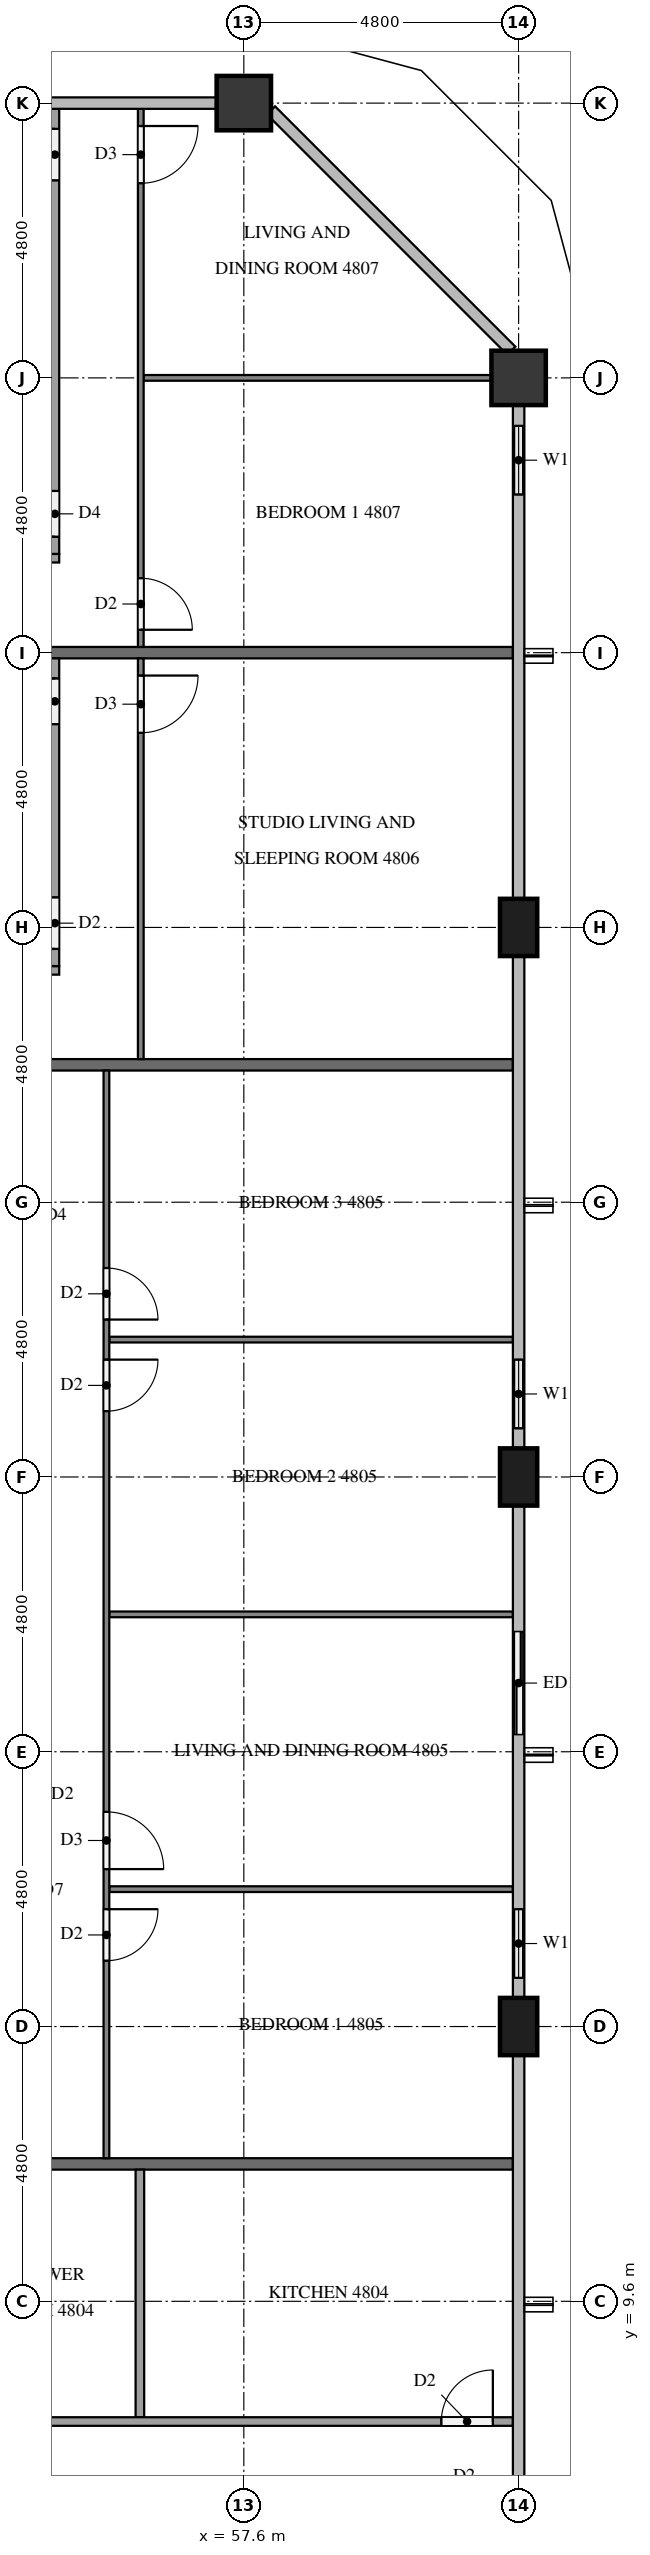
"""IFC4 building model, lengths in metres.
Left out: names, types, materials, properties, quantities, classifications, styles, units other than length and angle.
Written with IfcOpenShell. Run it as: python <this file> out.ifc"""

import sys

from ifc_helpers import new_model, si_unit, direction, frame, frame_2d, origin, origin_2d, place, context, subcontext, project, spatial, rectangle, extrude, element, fill, save


model = new_model("IFC4")
c1 = context("Model", 3, precision=1e-05, world=origin(), true_north=direction((0.0, 1.0)))
c2 = subcontext(c1, "Body", "Model", "MODEL_VIEW")
j1 = project(units=[si_unit("LENGTHUNIT", "METRE"), si_unit("PLANEANGLEUNIT", "RADIAN")], contexts=[c1])
p1 = place(None, origin())
s1 = spatial("IfcSite", under=j1, at=p1, CompositionType="ELEMENT")
p2 = place(p1, origin())
s2 = spatial("IfcBuilding", under=s1, at=p2, CompositionType="ELEMENT")
p3 = place(p2, frame((0.0, 0.0, 185.9)))
s3 = spatial("IfcBuildingStorey", under=s2, at=p3, CompositionType="ELEMENT", Elevation=185.9)
for number, where, z_axis, x_axis in (
    (1, (62.4, 14.4, 0.0), (0.0, 0.0, 1.0), (0.0, 1.0, 0.0)),
    (2, (62.4, 24.0, 0.0), (0.0, 0.0, 1.0), (0.0, 1.0, 0.0)),
    (3, (62.4, 33.6, 0.0), (0.0, 0.0, 1.0), (0.0, 1.0, 0.0)),
):
    element("IfcColumn", number, at=place(p3, frame(where, z_axis=z_axis, x_axis=x_axis)), inside=s3, PredefinedType="COLUMN", context=c2, shape_type="SweptSolid", body=[
        extrude(rectangle(XDim=1.0, YDim=0.65, at=origin_2d()), origin(), (0.0, 0.0, 1.0), 3.2),
    ])
for number, where, z_axis, x_axis in (
    (4, (62.4, 43.2, 0.0), (0.0, 0.0, 1.0), (1.0, 0.0, 0.0)),
    (5, (57.6, 48.0, 0.0), (0.0, 0.0, 1.0), (1.0, 0.0, 0.0)),
):
    element("IfcColumn", number, at=place(p3, frame(where, z_axis=z_axis, x_axis=x_axis)), inside=s3, PredefinedType="COLUMN", context=c2, shape_type="SweptSolid", body=[
        extrude(rectangle(XDim=0.95, YDim=0.95, at=origin_2d()), origin(), (0.0, 0.0, 1.0), 3.2),
    ])
p4 = place(p3, frame((62.4, 14.9, 0.0), z_axis=(0.0, 0.0, 1.0), x_axis=(0.0, 1.0, 0.0)))
e6 = element("IfcWall", 6, at=p4, inside=s3, PredefinedType="SOLIDWALL", context=c2, shape_type="SweptSolid", body=[
    extrude(rectangle(XDim=1.9, YDim=0.15, at=frame_2d((0.95, 0.0))), origin(), (0.0, 0.0, 1.0), 3.2),
])
p5 = place(p4, frame((0.35, 0.0, 0.9)))
e7 = element("IfcOpeningElement", 7, at=p5, cuts=e6, PredefinedType="OPENING", context=c2, shape_type="SweptSolid", body=[
    extrude(rectangle(XDim=1.2, YDim=1.4, at=frame_2d((0.6, 0.7))), frame((0.0, 0.085, 0.0), z_axis=(0.0, -1.0, 0.0), x_axis=(1.0, 0.0, 0.0)), (0.0, 0.0, 1.0), 0.17),
])
p6 = place(p3, frame((62.4, 19.2, 0.0), z_axis=(0.0, 0.0, 1.0), x_axis=(0.0, 1.0, 0.0)))
e8 = element("IfcWall", 8, at=p6, inside=s3, PredefinedType="SOLIDWALL", context=c2, shape_type="SweptSolid", body=[
    extrude(rectangle(XDim=2.4, YDim=0.15, at=frame_2d((1.2, 0.0))), origin(), (0.0, 0.0, 1.0), 3.2),
])
p7 = place(p6, frame((0.3, 0.0, 0.0)))
e9 = element("IfcOpeningElement", 9, at=p7, cuts=e8, PredefinedType="OPENING", context=c2, shape_type="SweptSolid", body=[
    extrude(rectangle(XDim=1.8, YDim=2.4, at=frame_2d((0.9, 1.2))), frame((0.0, 0.085, 0.0), z_axis=(0.0, -1.0, 0.0), x_axis=(1.0, 0.0, 0.0)), (0.0, 0.0, 1.0), 0.17),
])
p8 = place(p3, frame((62.4, 24.5, 0.0), z_axis=(0.0, 0.0, 1.0), x_axis=(0.0, 1.0, 0.0)))
e10 = element("IfcWall", 10, at=p8, inside=s3, PredefinedType="SOLIDWALL", context=c2, shape_type="SweptSolid", body=[
    extrude(rectangle(XDim=1.9, YDim=0.15, at=frame_2d((0.95, 0.0))), origin(), (0.0, 0.0, 1.0), 3.2),
])
p9 = place(p8, frame((0.35, 0.0, 0.9)))
e11 = element("IfcOpeningElement", 11, at=p9, cuts=e10, PredefinedType="OPENING", context=c2, shape_type="SweptSolid", body=[
    extrude(rectangle(XDim=1.2, YDim=1.4, at=frame_2d((0.6, 0.7))), frame((0.0, 0.085, 0.0), z_axis=(0.0, -1.0, 0.0), x_axis=(1.0, 0.0, 0.0)), (0.0, 0.0, 1.0), 0.17),
])
p10 = place(p3, frame((62.4, 40.8, 0.0), z_axis=(0.0, 0.0, 1.0), x_axis=(0.0, 1.0, 0.0)))
e12 = element("IfcWall", 12, at=p10, inside=s3, PredefinedType="SOLIDWALL", context=c2, shape_type="SweptSolid", body=[
    extrude(rectangle(XDim=1.925, YDim=0.15, at=frame_2d((0.962, 0.0))), origin(), (0.0, 0.0, 1.0), 3.2),
])
p11 = place(p10, frame((0.363, 0.0, 0.9)))
e13 = element("IfcOpeningElement", 13, at=p11, cuts=e12, PredefinedType="OPENING", context=c2, shape_type="SweptSolid", body=[
    extrude(rectangle(XDim=1.2, YDim=1.4, at=frame_2d((0.6, 0.7))), frame((0.0, 0.085, 0.0), z_axis=(0.0, -1.0, 0.0), x_axis=(1.0, 0.0, 0.0)), (0.0, 0.0, 1.0), 0.17),
])
for number, where, z_axis, x_axis in (
    (14, (50.5, 12.0, 0.0), (0.0, 0.0, 1.0), (1.0, 0.0, 0.0)),
    (15, (50.5, 31.2, 0.0), (0.0, 0.0, 1.0), (1.0, 0.0, 0.0)),
    (16, (50.5, 38.4, 0.0), (0.0, 0.0, 1.0), (1.0, 0.0, 0.0)),
):
    element("IfcWall", number, at=place(p3, frame(where, z_axis=z_axis, x_axis=x_axis)), inside=s3, PredefinedType="PARTITIONING", context=c2, shape_type="SweptSolid", body=[
        extrude(rectangle(XDim=11.8, YDim=0.2, at=frame_2d((5.9, 0.0))), origin(), (0.0, 0.0, 1.0), 3.2),
    ])
p12 = place(p3, frame((55.784, 11.9, 0.0), z_axis=(0.0, 0.0, 1.0), x_axis=(0.0, -1.0, 0.0)))
e17 = element("IfcWall", 17, at=p12, inside=s3, PredefinedType="PARTITIONING", context=c2, shape_type="SweptSolid", body=[
    extrude(rectangle(XDim=4.325, YDim=0.15, at=frame_2d((2.163, 0.0))), origin(), (0.0, 0.0, 1.0), 3.2),
])
p13 = place(p3, frame((44.925, 7.5, 0.0), z_axis=(0.0, 0.0, 1.0), x_axis=(1.0, 0.0, 0.0)))
e18 = element("IfcWall", 18, at=p13, inside=s3, PredefinedType="PARTITIONING", context=c2, shape_type="SweptSolid", body=[
    extrude(rectangle(XDim=17.375, YDim=0.15, at=frame_2d((8.688, 0.0))), origin(), (0.0, 0.0, 1.0), 3.2),
])
p14 = place(p13, frame((0.3, 0.0, 0.0)))
e19 = element("IfcOpeningElement", 19, at=p14, cuts=e18, PredefinedType="OPENING", context=c2, shape_type="SweptSolid", body=[
    extrude(rectangle(XDim=0.8, YDim=2.1, at=frame_2d((0.4, 1.05))), frame((0.0, 0.085, 0.0), z_axis=(0.0, -1.0, 0.0), x_axis=(1.0, 0.0, 0.0)), (0.0, 0.0, 1.0), 0.17),
])
p15 = place(p13, frame((6.377, 0.0, 0.0)))
e20 = element("IfcOpeningElement", 20, at=p15, cuts=e18, PredefinedType="OPENING", context=c2, shape_type="SweptSolid", body=[
    extrude(rectangle(XDim=0.9, YDim=2.1, at=frame_2d((0.45, 1.05))), frame((0.0, 0.085, 0.0), z_axis=(0.0, -1.0, 0.0), x_axis=(1.0, 0.0, 0.0)), (0.0, 0.0, 1.0), 0.17),
])
p16 = place(p13, frame((7.927, 0.0, 0.0)))
e21 = element("IfcOpeningElement", 21, at=p16, cuts=e18, PredefinedType="OPENING", context=c2, shape_type="SweptSolid", body=[
    extrude(rectangle(XDim=0.8, YDim=2.1, at=frame_2d((0.4, 1.05))), frame((0.0, 0.085, 0.0), z_axis=(0.0, -1.0, 0.0), x_axis=(1.0, 0.0, 0.0)), (0.0, 0.0, 1.0), 0.17),
])
p17 = place(p13, frame((16.125, 0.0, 0.0)))
e22 = element("IfcOpeningElement", 22, at=p17, cuts=e18, PredefinedType="OPENING", context=c2, shape_type="SweptSolid", body=[
    extrude(rectangle(XDim=0.9, YDim=2.1, at=frame_2d((0.45, 1.05))), frame((0.0, 0.085, 0.0), z_axis=(0.0, -1.0, 0.0), x_axis=(1.0, 0.0, 0.0)), (0.0, 0.0, 1.0), 0.17),
])
for number, where, z_axis, x_axis in (
    (23, (55.25, 16.8, 0.0), (0.0, 0.0, 1.0), (1.0, 0.0, 0.0)),
    (24, (55.25, 21.6, 0.0), (0.0, 0.0, 1.0), (1.0, 0.0, 0.0)),
    (25, (55.25, 26.4, 0.0), (0.0, 0.0, 1.0), (1.0, 0.0, 0.0)),
):
    element("IfcWall", number, at=place(p3, frame(where, z_axis=z_axis, x_axis=x_axis)), inside=s3, PredefinedType="PARTITIONING", context=c2, shape_type="SweptSolid", body=[
        extrude(rectangle(XDim=7.05, YDim=0.1, at=frame_2d((3.525, 0.0))), origin(), (0.0, 0.0, 1.0), 3.2),
    ])
p18 = place(p3, frame((55.2, 31.1, 0.0), z_axis=(0.0, 0.0, 1.0), x_axis=(0.0, -1.0, 0.0)))
e26 = element("IfcWall", 26, at=p18, inside=s3, PredefinedType="PARTITIONING", context=c2, shape_type="SweptSolid", body=[
    extrude(rectangle(XDim=19.0, YDim=0.1, at=frame_2d((9.5, 0.0))), origin(), (0.0, 0.0, 1.0), 3.2),
])
p19 = place(p18, frame((14.65, 0.0, 0.0)))
e27 = element("IfcOpeningElement", 27, at=p19, cuts=e26, PredefinedType="OPENING", context=c2, shape_type="SweptSolid", body=[
    extrude(rectangle(XDim=0.9, YDim=2.1, at=frame_2d((0.45, 1.05))), frame((0.0, 0.06, 0.0), z_axis=(0.0, -1.0, 0.0), x_axis=(1.0, 0.0, 0.0)), (0.0, 0.0, 1.0), 0.12),
])
p20 = place(p18, frame((12.95, 0.0, 0.0)))
e28 = element("IfcOpeningElement", 28, at=p20, cuts=e26, PredefinedType="OPENING", context=c2, shape_type="SweptSolid", body=[
    extrude(rectangle(XDim=1.0, YDim=2.1, at=frame_2d((0.5, 1.05))), frame((0.0, 0.06, 0.0), z_axis=(0.0, -1.0, 0.0), x_axis=(1.0, 0.0, 0.0)), (0.0, 0.0, 1.0), 0.12),
])
p21 = place(p18, frame((5.05, 0.0, 0.0)))
e29 = element("IfcOpeningElement", 29, at=p21, cuts=e26, PredefinedType="OPENING", context=c2, shape_type="SweptSolid", body=[
    extrude(rectangle(XDim=0.9, YDim=2.1, at=frame_2d((0.45, 1.05))), frame((0.0, 0.06, 0.0), z_axis=(0.0, -1.0, 0.0), x_axis=(1.0, 0.0, 0.0)), (0.0, 0.0, 1.0), 0.12),
])
p22 = place(p18, frame((3.45, 0.0, 0.0)))
e30 = element("IfcOpeningElement", 30, at=p22, cuts=e26, PredefinedType="OPENING", context=c2, shape_type="SweptSolid", body=[
    extrude(rectangle(XDim=0.9, YDim=2.1, at=frame_2d((0.45, 1.05))), frame((0.0, 0.06, 0.0), z_axis=(0.0, -1.0, 0.0), x_axis=(1.0, 0.0, 0.0)), (0.0, 0.0, 1.0), 0.12),
])
p23 = place(p3, frame((55.8, 38.3, 0.0), z_axis=(0.0, 0.0, 1.0), x_axis=(0.0, -1.0, 0.0)))
e31 = element("IfcWall", 31, at=p23, inside=s3, PredefinedType="PARTITIONING", context=c2, shape_type="SweptSolid", body=[
    extrude(rectangle(XDim=7.0, YDim=0.1, at=frame_2d((3.5, 0.0))), origin(), (0.0, 0.0, 1.0), 3.2),
])
p24 = place(p23, frame((0.3, 0.0, 0.0)))
e32 = element("IfcOpeningElement", 32, at=p24, cuts=e31, PredefinedType="OPENING", context=c2, shape_type="SweptSolid", body=[
    extrude(rectangle(XDim=1.0, YDim=2.1, at=frame_2d((0.5, 1.05))), frame((0.0, 0.06, 0.0), z_axis=(0.0, -1.0, 0.0), x_axis=(1.0, 0.0, 0.0)), (0.0, 0.0, 1.0), 0.12),
])
p25 = place(p3, frame((50.5, 32.85, 0.0), z_axis=(0.0, 0.0, 1.0), x_axis=(1.0, 0.0, 0.0)))
e33 = element("IfcWall", 33, at=p25, inside=s3, PredefinedType="PARTITIONING", context=c2, shape_type="SweptSolid", body=[
    extrude(rectangle(XDim=3.875, YDim=0.15, at=frame_2d((1.938, 0.0))), origin(), (0.0, 0.0, 1.0), 3.2),
])
p26 = place(p3, frame((54.3, 32.925, 0.0), z_axis=(0.0, 0.0, 1.0), x_axis=(0.0, 1.0, 0.0)))
e34 = element("IfcWall", 34, at=p26, inside=s3, PredefinedType="PARTITIONING", context=c2, shape_type="SweptSolid", body=[
    extrude(rectangle(XDim=5.375, YDim=0.15, at=frame_2d((2.688, 0.0))), origin(), (0.0, 0.0, 1.0), 3.2),
])
p27 = place(p26, frame((0.3, 0.0, 0.0)))
e35 = element("IfcOpeningElement", 35, at=p27, cuts=e34, PredefinedType="OPENING", context=c2, shape_type="SweptSolid", body=[
    extrude(rectangle(XDim=0.9, YDim=2.1, at=frame_2d((0.45, 1.05))), frame((0.0, 0.085, 0.0), z_axis=(0.0, -1.0, 0.0), x_axis=(1.0, 0.0, 0.0)), (0.0, 0.0, 1.0), 0.17),
])
p28 = place(p26, frame((4.225, 0.0, 0.0)))
e36 = element("IfcOpeningElement", 36, at=p28, cuts=e34, PredefinedType="OPENING", context=c2, shape_type="SweptSolid", body=[
    extrude(rectangle(XDim=0.8, YDim=2.1, at=frame_2d((0.4, 1.05))), frame((0.0, 0.085, 0.0), z_axis=(0.0, -1.0, 0.0), x_axis=(1.0, 0.0, 0.0)), (0.0, 0.0, 1.0), 0.17),
])
p29 = place(p3, frame((55.85, 43.2, 0.0), z_axis=(0.0, 0.0, 1.0), x_axis=(1.0, 0.0, 0.0)))
e37 = element("IfcWall", 37, at=p29, inside=s3, PredefinedType="PARTITIONING", context=c2, shape_type="SweptSolid", body=[
    extrude(rectangle(XDim=6.075, YDim=0.1, at=frame_2d((3.038, 0.0))), origin(), (0.0, 0.0, 1.0), 3.2),
])
p30 = place(p3, frame((55.8, 47.9, 0.0), z_axis=(0.0, 0.0, 1.0), x_axis=(0.0, -1.0, 0.0)))
e38 = element("IfcWall", 38, at=p30, inside=s3, PredefinedType="PARTITIONING", context=c2, shape_type="SweptSolid", body=[
    extrude(rectangle(XDim=9.4, YDim=0.1, at=frame_2d((4.7, 0.0))), origin(), (0.0, 0.0, 1.0), 3.2),
])
p31 = place(p30, frame((8.2, 0.0, 0.0)))
e39 = element("IfcOpeningElement", 39, at=p31, cuts=e38, PredefinedType="OPENING", context=c2, shape_type="SweptSolid", body=[
    extrude(rectangle(XDim=0.9, YDim=2.1, at=frame_2d((0.45, 1.05))), frame((0.0, 0.06, 0.0), z_axis=(0.0, -1.0, 0.0), x_axis=(1.0, 0.0, 0.0)), (0.0, 0.0, 1.0), 0.12),
])
p32 = place(p30, frame((0.3, 0.0, 0.0)))
e40 = element("IfcOpeningElement", 40, at=p32, cuts=e38, PredefinedType="OPENING", context=c2, shape_type="SweptSolid", body=[
    extrude(rectangle(XDim=1.0, YDim=2.1, at=frame_2d((0.5, 1.05))), frame((0.0, 0.06, 0.0), z_axis=(0.0, -1.0, 0.0), x_axis=(1.0, 0.0, 0.0)), (0.0, 0.0, 1.0), 0.12),
])
p33 = place(p3, frame((50.5, 40.05, 0.0), z_axis=(0.0, 0.0, 1.0), x_axis=(1.0, 0.0, 0.0)))
e41 = element("IfcWall", 41, at=p33, inside=s3, PredefinedType="PARTITIONING", context=c2, shape_type="SweptSolid", body=[
    extrude(rectangle(XDim=3.875, YDim=0.15, at=frame_2d((1.938, 0.0))), origin(), (0.0, 0.0, 1.0), 3.2),
])
p34 = place(p3, frame((54.3, 40.125, 0.0), z_axis=(0.0, 0.0, 1.0), x_axis=(0.0, 1.0, 0.0)))
e42 = element("IfcWall", 42, at=p34, inside=s3, PredefinedType="PARTITIONING", context=c2, shape_type="SweptSolid", body=[
    extrude(rectangle(XDim=7.775, YDim=0.15, at=frame_2d((3.887, 0.0))), origin(), (0.0, 0.0, 1.0), 3.2),
])
p35 = place(p34, frame((0.3, 0.0, 0.0)))
e43 = element("IfcOpeningElement", 43, at=p35, cuts=e42, PredefinedType="OPENING", context=c2, shape_type="SweptSolid", body=[
    extrude(rectangle(XDim=0.8, YDim=2.1, at=frame_2d((0.4, 1.05))), frame((0.0, 0.085, 0.0), z_axis=(0.0, -1.0, 0.0), x_axis=(1.0, 0.0, 0.0)), (0.0, 0.0, 1.0), 0.17),
])
p36 = place(p34, frame((6.525, 0.0, 0.0)))
e44 = element("IfcOpeningElement", 44, at=p36, cuts=e42, PredefinedType="OPENING", context=c2, shape_type="SweptSolid", body=[
    extrude(rectangle(XDim=0.9, YDim=2.1, at=frame_2d((0.45, 1.05))), frame((0.0, 0.085, 0.0), z_axis=(0.0, -1.0, 0.0), x_axis=(1.0, 0.0, 0.0)), (0.0, 0.0, 1.0), 0.17),
])
p37 = place(p5, origin())
e45 = element("IfcWindow", 45, at=p37, inside=s3, PartitioningType="SINGLE_PANEL", PredefinedType="WINDOW", context=c2, shape_type="SweptSolid", body=[
    extrude(rectangle(XDim=1.2, YDim=1.4, at=frame_2d((0.6, 0.7))), frame((0.0, 0.03, 0.0), z_axis=(0.0, -1.0, 0.0), x_axis=(1.0, 0.0, 0.0)), (0.0, 0.0, 1.0), 0.06),
])
fill(e7, e45)
p38 = place(p7, origin())
e46 = element("IfcDoor", 46, at=p38, inside=s3, OperationType="SLIDING_TO_RIGHT", PredefinedType="DOOR", context=c2, shape_type="SweptSolid", body=[
    extrude(rectangle(XDim=1.8, YDim=2.4, at=frame_2d((0.9, 1.2))), frame((0.0, 0.025, 0.0), z_axis=(0.0, -1.0, 0.0), x_axis=(1.0, 0.0, 0.0)), (0.0, 0.0, 1.0), 0.05),
])
fill(e9, e46)
p39 = place(p9, origin())
e47 = element("IfcWindow", 47, at=p39, inside=s3, PartitioningType="SINGLE_PANEL", PredefinedType="WINDOW", context=c2, shape_type="SweptSolid", body=[
    extrude(rectangle(XDim=1.2, YDim=1.4, at=frame_2d((0.6, 0.7))), frame((0.0, 0.03, 0.0), z_axis=(0.0, -1.0, 0.0), x_axis=(1.0, 0.0, 0.0)), (0.0, 0.0, 1.0), 0.06),
])
fill(e11, e47)
p40 = place(p11, origin())
e48 = element("IfcWindow", 48, at=p40, inside=s3, PartitioningType="SINGLE_PANEL", PredefinedType="WINDOW", context=c2, shape_type="SweptSolid", body=[
    extrude(rectangle(XDim=1.2, YDim=1.4, at=frame_2d((0.6, 0.7))), frame((0.0, 0.03, 0.0), z_axis=(0.0, -1.0, 0.0), x_axis=(1.0, 0.0, 0.0)), (0.0, 0.0, 1.0), 0.06),
])
fill(e13, e48)
p41 = place(p17, origin())
e49 = element("IfcDoor", 49, at=p41, inside=s3, OperationType="SINGLE_SWING_RIGHT", PredefinedType="DOOR", context=c2, shape_type="SweptSolid", body=[
    extrude(rectangle(XDim=0.9, YDim=2.1, at=frame_2d((0.45, 1.05))), frame((0.0, 0.025, 0.0), z_axis=(0.0, -1.0, 0.0), x_axis=(1.0, 0.0, 0.0)), (0.0, 0.0, 1.0), 0.05),
])
fill(e22, e49)
p42 = place(p19, origin())
e50 = element("IfcDoor", 50, at=p42, inside=s3, OperationType="SINGLE_SWING_LEFT", PredefinedType="DOOR", context=c2, shape_type="SweptSolid", body=[
    extrude(rectangle(XDim=0.9, YDim=2.1, at=frame_2d((0.45, 1.05))), frame((0.0, 0.025, 0.0), z_axis=(0.0, -1.0, 0.0), x_axis=(1.0, 0.0, 0.0)), (0.0, 0.0, 1.0), 0.05),
])
fill(e27, e50)
p43 = place(p20, origin())
e51 = element("IfcDoor", 51, at=p43, inside=s3, OperationType="SINGLE_SWING_RIGHT", PredefinedType="DOOR", context=c2, shape_type="SweptSolid", body=[
    extrude(rectangle(XDim=1.0, YDim=2.1, at=frame_2d((0.5, 1.05))), frame((0.0, 0.025, 0.0), z_axis=(0.0, -1.0, 0.0), x_axis=(1.0, 0.0, 0.0)), (0.0, 0.0, 1.0), 0.05),
])
fill(e28, e51)
p44 = place(p21, origin())
e52 = element("IfcDoor", 52, at=p44, inside=s3, OperationType="SINGLE_SWING_LEFT", PredefinedType="DOOR", context=c2, shape_type="SweptSolid", body=[
    extrude(rectangle(XDim=0.9, YDim=2.1, at=frame_2d((0.45, 1.05))), frame((0.0, 0.025, 0.0), z_axis=(0.0, -1.0, 0.0), x_axis=(1.0, 0.0, 0.0)), (0.0, 0.0, 1.0), 0.05),
])
fill(e29, e52)
p45 = place(p22, origin())
e53 = element("IfcDoor", 53, at=p45, inside=s3, OperationType="SINGLE_SWING_RIGHT", PredefinedType="DOOR", context=c2, shape_type="SweptSolid", body=[
    extrude(rectangle(XDim=0.9, YDim=2.1, at=frame_2d((0.45, 1.05))), frame((0.0, 0.025, 0.0), z_axis=(0.0, -1.0, 0.0), x_axis=(1.0, 0.0, 0.0)), (0.0, 0.0, 1.0), 0.05),
])
fill(e30, e53)
p46 = place(p24, origin())
e54 = element("IfcDoor", 54, at=p46, inside=s3, OperationType="SINGLE_SWING_LEFT", PredefinedType="DOOR", context=c2, shape_type="SweptSolid", body=[
    extrude(rectangle(XDim=1.0, YDim=2.1, at=frame_2d((0.5, 1.05))), frame((0.0, 0.025, 0.0), z_axis=(0.0, -1.0, 0.0), x_axis=(1.0, 0.0, 0.0)), (0.0, 0.0, 1.0), 0.05),
])
fill(e32, e54)
p47 = place(p27, origin())
e55 = element("IfcDoor", 55, at=p47, inside=s3, OperationType="SINGLE_SWING_LEFT", PredefinedType="DOOR", context=c2, shape_type="SweptSolid", body=[
    extrude(rectangle(XDim=0.9, YDim=2.1, at=frame_2d((0.45, 1.05))), frame((0.0, 0.025, 0.0), z_axis=(0.0, -1.0, 0.0), x_axis=(1.0, 0.0, 0.0)), (0.0, 0.0, 1.0), 0.05),
])
fill(e35, e55)
p48 = place(p28, origin())
e56 = element("IfcDoor", 56, at=p48, inside=s3, OperationType="SINGLE_SWING_RIGHT", PredefinedType="DOOR", context=c2, shape_type="SweptSolid", body=[
    extrude(rectangle(XDim=0.8, YDim=2.1, at=frame_2d((0.4, 1.05))), frame((0.0, 0.025, 0.0), z_axis=(0.0, -1.0, 0.0), x_axis=(1.0, 0.0, 0.0)), (0.0, 0.0, 1.0), 0.05),
])
fill(e36, e56)
p49 = place(p31, origin())
e57 = element("IfcDoor", 57, at=p49, inside=s3, OperationType="SINGLE_SWING_RIGHT", PredefinedType="DOOR", context=c2, shape_type="SweptSolid", body=[
    extrude(rectangle(XDim=0.9, YDim=2.1, at=frame_2d((0.45, 1.05))), frame((0.0, 0.025, 0.0), z_axis=(0.0, -1.0, 0.0), x_axis=(1.0, 0.0, 0.0)), (0.0, 0.0, 1.0), 0.05),
])
fill(e39, e57)
p50 = place(p32, origin())
e58 = element("IfcDoor", 58, at=p50, inside=s3, OperationType="SINGLE_SWING_LEFT", PredefinedType="DOOR", context=c2, shape_type="SweptSolid", body=[
    extrude(rectangle(XDim=1.0, YDim=2.1, at=frame_2d((0.5, 1.05))), frame((0.0, 0.025, 0.0), z_axis=(0.0, -1.0, 0.0), x_axis=(1.0, 0.0, 0.0)), (0.0, 0.0, 1.0), 0.05),
])
fill(e40, e58)
p51 = place(p35, origin())
e59 = element("IfcDoor", 59, at=p51, inside=s3, OperationType="SINGLE_SWING_LEFT", PredefinedType="DOOR", context=c2, shape_type="SweptSolid", body=[
    extrude(rectangle(XDim=0.8, YDim=2.1, at=frame_2d((0.4, 1.05))), frame((0.0, 0.025, 0.0), z_axis=(0.0, -1.0, 0.0), x_axis=(1.0, 0.0, 0.0)), (0.0, 0.0, 1.0), 0.05),
])
fill(e43, e59)
p52 = place(p36, origin())
e60 = element("IfcDoor", 60, at=p52, inside=s3, OperationType="SINGLE_SWING_RIGHT", PredefinedType="DOOR", context=c2, shape_type="SweptSolid", body=[
    extrude(rectangle(XDim=0.9, YDim=2.1, at=frame_2d((0.45, 1.05))), frame((0.0, 0.025, 0.0), z_axis=(0.0, -1.0, 0.0), x_axis=(1.0, 0.0, 0.0)), (0.0, 0.0, 1.0), 0.05),
])
fill(e44, e60)
save(model, sys.argv[1])
